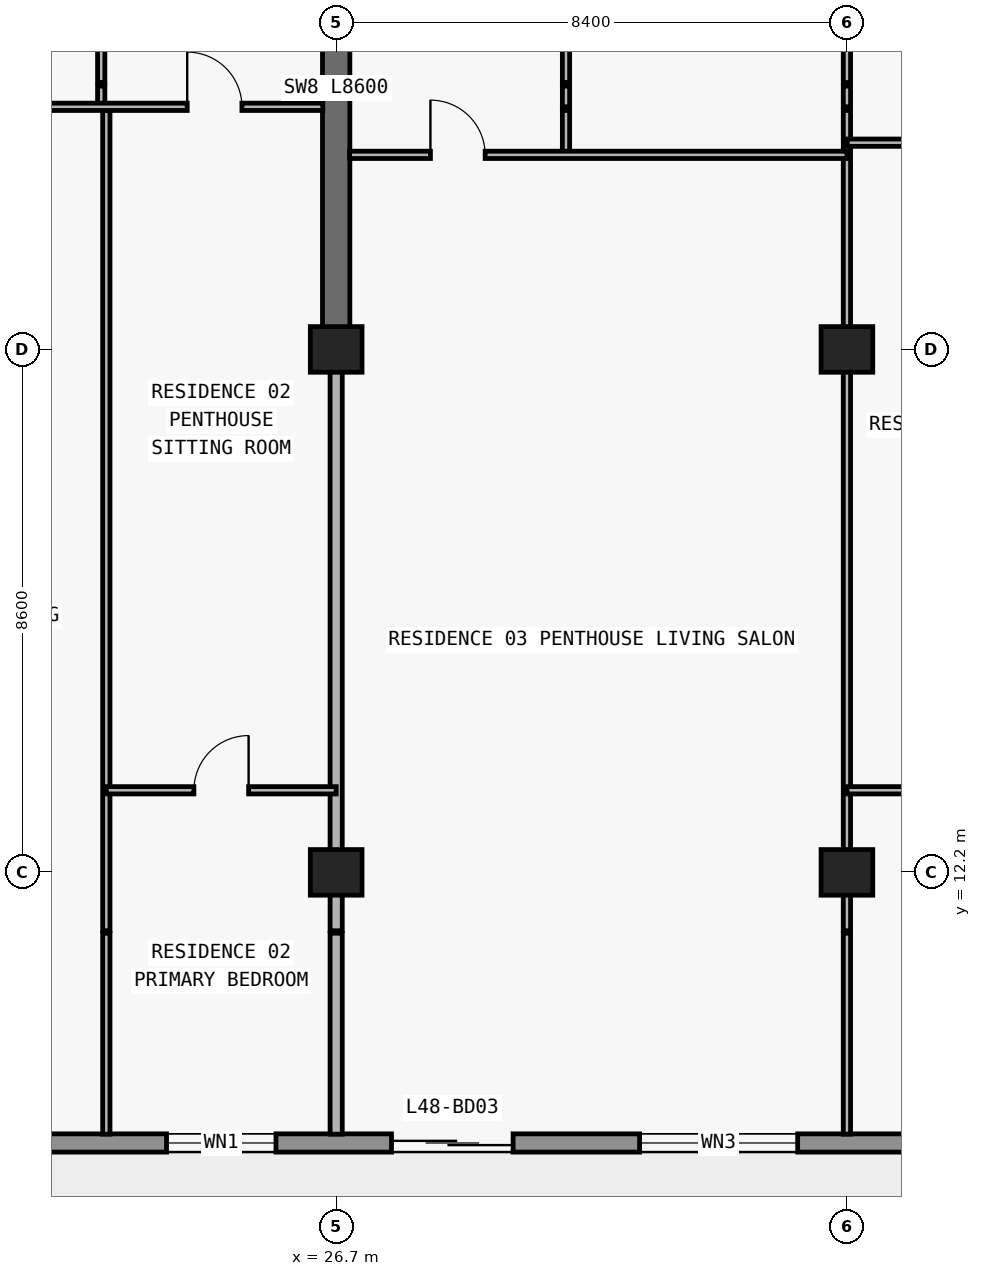
"""IFC4 building model, lengths in metres.
Left out: names, types, materials, properties, quantities, classifications, styles, units other than length and angle.
Written with IfcOpenShell. Run it as: python <this file> out.ifc"""

import sys

from ifc_helpers import new_model, si_unit, direction, frame, frame_2d, origin, origin_2d, place, context, subcontext, project, spatial, rectangle, extrude, element, fill, save


model = new_model("IFC4")
c1 = context("Model", 3, precision=1e-05, world=origin(), true_north=direction((0.0, 1.0)))
c2 = subcontext(c1, "Body", "Model", "MODEL_VIEW")
j1 = project(units=[si_unit("LENGTHUNIT", "METRE"), si_unit("PLANEANGLEUNIT", "RADIAN")], contexts=[c1])
p1 = place(None, origin())
s1 = spatial("IfcSite", under=j1, at=p1, CompositionType="ELEMENT")
p2 = place(p1, origin())
s2 = spatial("IfcBuilding", under=s1, at=p2, CompositionType="ELEMENT")
p3 = place(p2, frame((0.0, 0.0, 173.7)))
s3 = spatial("IfcBuildingStorey", under=s2, at=p3, CompositionType="ELEMENT", Elevation=173.7)
for number, where, z_axis, x_axis in (
    (1, (26.7, 12.2, 0.0), (0.0, 0.0, 1.0), (1.0, 0.0, 0.0)),
    (2, (35.1, 12.2, 0.0), (0.0, 0.0, 1.0), (1.0, 0.0, 0.0)),
    (3, (26.7, 20.8, 0.0), (0.0, 0.0, 1.0), (1.0, 0.0, 0.0)),
    (4, (35.1, 20.8, 0.0), (0.0, 0.0, 1.0), (1.0, 0.0, 0.0)),
):
    element("IfcColumn", number, at=place(p3, frame(where, z_axis=z_axis, x_axis=x_axis)), inside=s3, PredefinedType="COLUMN", context=c2, shape_type="SweptSolid", body=[
        extrude(rectangle(XDim=0.85, YDim=0.75, at=origin_2d()), origin(), (0.0, 0.0, 1.0), 3.05),
    ])
p4 = place(p3, frame((26.7, 20.8, 0.0), z_axis=(0.0, 0.0, 1.0), x_axis=(0.0, 1.0, 0.0)))
e5 = element("IfcWall", 5, at=p4, inside=s3, PredefinedType="SHEAR", context=c2, shape_type="SweptSolid", body=[
    extrude(rectangle(XDim=8.6, YDim=0.45, at=frame_2d((4.3, 0.0))), origin(), (0.0, 0.0, 1.0), 3.05),
])
p5 = place(p3, frame((67.7, 7.75, 0.0), z_axis=(0.0, 0.0, 1.0), x_axis=(-1.0, 0.0, 0.0)))
e6 = element("IfcWall", 6, at=p5, inside=s3, PredefinedType="STANDARD", context=c2, shape_type="SweptSolid", body=[
    extrude(rectangle(XDim=57.6, YDim=0.3, at=frame_2d((28.8, 0.0))), origin(), (0.0, 0.0, 1.0), 3.05),
])
p6 = place(p5, frame((54.673, 0.0, 0.0)))
e7 = element("IfcOpeningElement", 7, at=p6, cuts=e6, PredefinedType="OPENING", context=c2, shape_type="SweptSolid", body=[
    extrude(rectangle(XDim=2.0, YDim=2.3, at=frame_2d((1.0, 1.15))), frame((0.0, 0.16, 0.0), z_axis=(0.0, -1.0, 0.0), x_axis=(1.0, 0.0, 0.0)), (0.0, 0.0, 1.0), 0.32),
])
p7 = place(p5, frame((50.473, 0.0, 0.85)))
e8 = element("IfcOpeningElement", 8, at=p7, cuts=e6, PredefinedType="OPENING", context=c2, shape_type="SweptSolid", body=[
    extrude(rectangle(XDim=2.2, YDim=1.55, at=frame_2d((1.1, 0.775))), frame((0.0, 0.16, 0.0), z_axis=(0.0, -1.0, 0.0), x_axis=(1.0, 0.0, 0.0)), (0.0, 0.0, 1.0), 0.32),
])
p8 = place(p5, frame((46.09, 0.0, 0.0)))
e9 = element("IfcOpeningElement", 9, at=p8, cuts=e6, PredefinedType="OPENING", context=c2, shape_type="SweptSolid", body=[
    extrude(rectangle(XDim=2.0, YDim=2.3, at=frame_2d((1.0, 1.15))), frame((0.0, 0.16, 0.0), z_axis=(0.0, -1.0, 0.0), x_axis=(1.0, 0.0, 0.0)), (0.0, 0.0, 1.0), 0.32),
])
p9 = place(p5, frame((41.99, 0.0, 0.85)))
e10 = element("IfcOpeningElement", 10, at=p9, cuts=e6, PredefinedType="OPENING", context=c2, shape_type="SweptSolid", body=[
    extrude(rectangle(XDim=1.8, YDim=1.55, at=frame_2d((0.9, 0.775))), frame((0.0, 0.16, 0.0), z_axis=(0.0, -1.0, 0.0), x_axis=(1.0, 0.0, 0.0)), (0.0, 0.0, 1.0), 0.32),
])
p10 = place(p5, frame((38.09, 0.0, 0.0)))
e11 = element("IfcOpeningElement", 11, at=p10, cuts=e6, PredefinedType="OPENING", context=c2, shape_type="SweptSolid", body=[
    extrude(rectangle(XDim=2.0, YDim=2.3, at=frame_2d((1.0, 1.15))), frame((0.0, 0.16, 0.0), z_axis=(0.0, -1.0, 0.0), x_axis=(1.0, 0.0, 0.0)), (0.0, 0.0, 1.0), 0.32),
])
p11 = place(p5, frame((33.41, 0.0, 0.65)))
e12 = element("IfcOpeningElement", 12, at=p11, cuts=e6, PredefinedType="OPENING", context=c2, shape_type="SweptSolid", body=[
    extrude(rectangle(XDim=2.6, YDim=1.85, at=frame_2d((1.3, 0.925))), frame((0.0, 0.16, 0.0), z_axis=(0.0, -1.0, 0.0), x_axis=(1.0, 0.0, 0.0)), (0.0, 0.0, 1.0), 0.32),
])
p12 = place(p5, frame((27.7, 0.0, 0.85)))
e13 = element("IfcOpeningElement", 13, at=p12, cuts=e6, PredefinedType="OPENING", context=c2, shape_type="SweptSolid", body=[
    extrude(rectangle(XDim=2.2, YDim=1.55, at=frame_2d((1.1, 0.775))), frame((0.0, 0.16, 0.0), z_axis=(0.0, -1.0, 0.0), x_axis=(1.0, 0.0, 0.0)), (0.0, 0.0, 1.0), 0.32),
])
p13 = place(p5, frame((19.7, 0.0, 0.85)))
e14 = element("IfcOpeningElement", 14, at=p13, cuts=e6, PredefinedType="OPENING", context=c2, shape_type="SweptSolid", body=[
    extrude(rectangle(XDim=2.2, YDim=1.55, at=frame_2d((1.1, 0.775))), frame((0.0, 0.16, 0.0), z_axis=(0.0, -1.0, 0.0), x_axis=(1.0, 0.0, 0.0)), (0.0, 0.0, 1.0), 0.32),
])
p14 = place(p5, frame((13.29, 0.0, 0.0)))
e15 = element("IfcOpeningElement", 15, at=p14, cuts=e6, PredefinedType="OPENING", context=c2, shape_type="SweptSolid", body=[
    extrude(rectangle(XDim=2.0, YDim=2.3, at=frame_2d((1.0, 1.15))), frame((0.0, 0.16, 0.0), z_axis=(0.0, -1.0, 0.0), x_axis=(1.0, 0.0, 0.0)), (0.0, 0.0, 1.0), 0.32),
])
p15 = place(p5, frame((9.19, 0.0, 0.85)))
e16 = element("IfcOpeningElement", 16, at=p15, cuts=e6, PredefinedType="OPENING", context=c2, shape_type="SweptSolid", body=[
    extrude(rectangle(XDim=1.8, YDim=1.55, at=frame_2d((0.9, 0.775))), frame((0.0, 0.16, 0.0), z_axis=(0.0, -1.0, 0.0), x_axis=(1.0, 0.0, 0.0)), (0.0, 0.0, 1.0), 0.32),
])
p16 = place(p5, frame((5.273, 0.0, 0.0)))
e17 = element("IfcOpeningElement", 17, at=p16, cuts=e6, PredefinedType="OPENING", context=c2, shape_type="SweptSolid", body=[
    extrude(rectangle(XDim=2.0, YDim=2.3, at=frame_2d((1.0, 1.15))), frame((0.0, 0.16, 0.0), z_axis=(0.0, -1.0, 0.0), x_axis=(1.0, 0.0, 0.0)), (0.0, 0.0, 1.0), 0.32),
])
p17 = place(p5, frame((1.073, 0.0, 0.85)))
e18 = element("IfcOpeningElement", 18, at=p17, cuts=e6, PredefinedType="OPENING", context=c2, shape_type="SweptSolid", body=[
    extrude(rectangle(XDim=2.2, YDim=1.55, at=frame_2d((1.1, 0.775))), frame((0.0, 0.16, 0.0), z_axis=(0.0, -1.0, 0.0), x_axis=(1.0, 0.0, 0.0)), (0.0, 0.0, 1.0), 0.32),
])
p18 = place(p3, frame((22.836, 24.79, 0.0), z_axis=(0.0, 0.0, 1.0), x_axis=(0.0, 1.0, 0.0)))
e19 = element("IfcWall", 19, at=p18, inside=s3, PredefinedType="PARTITIONING", context=c2, shape_type="SweptSolid", body=[
    extrude(rectangle(XDim=0.34, YDim=0.12, at=frame_2d((0.17, 0.0))), origin(), (0.0, 0.0, 1.0), 3.05),
])
p19 = place(p3, frame((22.836, 25.19, 0.0), z_axis=(0.0, 0.0, 1.0), x_axis=(0.0, 1.0, 0.0)))
e20 = element("IfcWall", 20, at=p19, inside=s3, PredefinedType="PARTITIONING", context=c2, shape_type="SweptSolid", body=[
    extrude(rectangle(XDim=4.69, YDim=0.12, at=frame_2d((2.345, 0.0))), origin(), (0.0, 0.0, 1.0), 3.05),
])
p20 = place(p19, frame((1.895, 0.0, 0.0)))
e21 = element("IfcOpeningElement", 21, at=p20, cuts=e20, PredefinedType="OPENING", context=c2, shape_type="SweptSolid", body=[
    extrude(rectangle(XDim=0.9, YDim=2.15, at=frame_2d((0.45, 1.075))), frame((0.0, 0.07, 0.0), z_axis=(0.0, -1.0, 0.0), x_axis=(1.0, 0.0, 0.0)), (0.0, 0.0, 1.0), 0.14),
])
p21 = place(p3, frame((22.92, 7.895, 0.0), z_axis=(0.0, 0.0, 1.0), x_axis=(0.0, 1.0, 0.0)))
e22 = element("IfcWall", 22, at=p21, inside=s3, PredefinedType="PARTITIONING", context=c2, shape_type="SweptSolid", body=[
    extrude(rectangle(XDim=3.305, YDim=0.12, at=frame_2d((1.652, 0.0))), origin(), (0.0, 0.0, 1.0), 3.05),
])
p22 = place(p3, frame((22.92, 11.24, 0.0), z_axis=(0.0, 0.0, 1.0), x_axis=(0.0, 1.0, 0.0)))
e23 = element("IfcWall", 23, at=p22, inside=s3, PredefinedType="PARTITIONING", context=c2, shape_type="SweptSolid", body=[
    extrude(rectangle(XDim=13.49, YDim=0.12, at=frame_2d((6.745, 0.0))), origin(), (0.0, 0.0, 1.0), 3.05),
])
p23 = place(p3, frame((26.7, 7.895, 0.0), z_axis=(0.0, 0.0, 1.0), x_axis=(0.0, 1.0, 0.0)))
e24 = element("IfcWall", 24, at=p23, inside=s3, PredefinedType="PARTITIONING", context=c2, shape_type="SweptSolid", body=[
    extrude(rectangle(XDim=3.305, YDim=0.2, at=frame_2d((1.652, 0.0))), origin(), (0.0, 0.0, 1.0), 3.05),
])
p24 = place(p3, frame((26.7, 11.24, 0.0), z_axis=(0.0, 0.0, 1.0), x_axis=(0.0, 1.0, 0.0)))
e25 = element("IfcWall", 25, at=p24, inside=s3, PredefinedType="PARTITIONING", context=c2, shape_type="SweptSolid", body=[
    extrude(rectangle(XDim=9.555, YDim=0.2, at=frame_2d((4.777, 0.0))), origin(), (0.0, 0.0, 1.0), 2.263),
])
p25 = place(p3, frame((30.48, 24.0, 0.0), z_axis=(0.0, 0.0, 1.0), x_axis=(0.0, 1.0, 0.0)))
e26 = element("IfcWall", 26, at=p25, inside=s3, PredefinedType="PARTITIONING", context=c2, shape_type="SweptSolid", body=[
    extrude(rectangle(XDim=0.73, YDim=0.12, at=frame_2d((0.365, 0.0))), origin(), (0.0, 0.0, 1.0), 3.05),
])
p26 = place(p3, frame((30.48, 24.79, 0.0), z_axis=(0.0, 0.0, 1.0), x_axis=(0.0, 1.0, 0.0)))
e27 = element("IfcWall", 27, at=p26, inside=s3, PredefinedType="PARTITIONING", context=c2, shape_type="SweptSolid", body=[
    extrude(rectangle(XDim=0.34, YDim=0.12, at=frame_2d((0.17, 0.0))), origin(), (0.0, 0.0, 1.0), 3.05),
])
p27 = place(p3, frame((30.48, 25.19, 0.0), z_axis=(0.0, 0.0, 1.0), x_axis=(0.0, 1.0, 0.0)))
e28 = element("IfcWall", 28, at=p27, inside=s3, PredefinedType="PARTITIONING", context=c2, shape_type="SweptSolid", body=[
    extrude(rectangle(XDim=3.61, YDim=0.12, at=frame_2d((1.805, 0.0))), origin(), (0.0, 0.0, 1.0), 3.05),
])
p28 = place(p27, frame((1.355, 0.0, 0.0)))
e29 = element("IfcOpeningElement", 29, at=p28, cuts=e28, PredefinedType="OPENING", context=c2, shape_type="SweptSolid", body=[
    extrude(rectangle(XDim=0.9, YDim=2.15, at=frame_2d((0.45, 1.075))), frame((0.0, 0.07, 0.0), z_axis=(0.0, -1.0, 0.0), x_axis=(1.0, 0.0, 0.0)), (0.0, 0.0, 1.0), 0.14),
])
p29 = place(p3, frame((35.1, 7.895, 0.0), z_axis=(0.0, 0.0, 1.0), x_axis=(0.0, 1.0, 0.0)))
e30 = element("IfcWall", 30, at=p29, inside=s3, PredefinedType="PARTITIONING", context=c2, shape_type="SweptSolid", body=[
    extrude(rectangle(XDim=3.305, YDim=0.12, at=frame_2d((1.652, 0.0))), origin(), (0.0, 0.0, 1.0), 3.05),
])
p30 = place(p3, frame((35.1, 11.24, 0.0), z_axis=(0.0, 0.0, 1.0), x_axis=(0.0, 1.0, 0.0)))
e31 = element("IfcWall", 31, at=p30, inside=s3, PredefinedType="PARTITIONING", context=c2, shape_type="SweptSolid", body=[
    extrude(rectangle(XDim=13.49, YDim=0.12, at=frame_2d((6.745, 0.0))), origin(), (0.0, 0.0, 1.0), 2.263),
])
p31 = place(p3, frame((35.1, 24.79, 0.0), z_axis=(0.0, 0.0, 1.0), x_axis=(0.0, 1.0, 0.0)))
e32 = element("IfcWall", 32, at=p31, inside=s3, PredefinedType="PARTITIONING", context=c2, shape_type="SweptSolid", body=[
    extrude(rectangle(XDim=0.34, YDim=0.12, at=frame_2d((0.17, 0.0))), origin(), (0.0, 0.0, 1.0), 2.263),
])
p32 = place(p3, frame((35.1, 25.19, 0.0), z_axis=(0.0, 0.0, 1.0), x_axis=(0.0, 1.0, 0.0)))
e33 = element("IfcWall", 33, at=p32, inside=s3, PredefinedType="PARTITIONING", context=c2, shape_type="SweptSolid", body=[
    extrude(rectangle(XDim=4.69, YDim=0.12, at=frame_2d((2.345, 0.0))), origin(), (0.0, 0.0, 1.0), 2.263),
])
p33 = place(p32, frame((1.255, 0.0, 0.0)))
e34 = element("IfcOpeningElement", 34, at=p33, cuts=e33, PredefinedType="OPENING", context=c2, shape_type="SweptSolid", body=[
    extrude(rectangle(XDim=0.9, YDim=2.15, at=frame_2d((0.45, 1.075))), frame((0.0, 0.07, 0.0), z_axis=(0.0, -1.0, 0.0), x_axis=(1.0, 0.0, 0.0)), (0.0, 0.0, 1.0), 0.14),
])
p34 = place(p3, frame((22.92, 13.55, 0.0), z_axis=(0.0, 0.0, 1.0), x_axis=(1.0, 0.0, 0.0)))
e35 = element("IfcWall", 35, at=p34, inside=s3, PredefinedType="PARTITIONING", context=c2, shape_type="SweptSolid", body=[
    extrude(rectangle(XDim=3.78, YDim=0.12, at=frame_2d((1.89, 0.0))), origin(), (0.0, 0.0, 1.0), 3.05),
])
p35 = place(p34, frame((1.44, 0.0, 0.0)))
e36 = element("IfcOpeningElement", 36, at=p35, cuts=e35, PredefinedType="OPENING", context=c2, shape_type="SweptSolid", body=[
    extrude(rectangle(XDim=0.9, YDim=2.15, at=frame_2d((0.45, 1.075))), frame((0.0, 0.07, 0.0), z_axis=(0.0, -1.0, 0.0), x_axis=(1.0, 0.0, 0.0)), (0.0, 0.0, 1.0), 0.14),
])
p36 = place(p3, frame((35.1, 13.55, 0.0), z_axis=(0.0, 0.0, 1.0), x_axis=(1.0, 0.0, 0.0)))
e37 = element("IfcWall", 37, at=p36, inside=s3, PredefinedType="PARTITIONING", context=c2, shape_type="SweptSolid", body=[
    extrude(rectangle(XDim=16.0, YDim=0.12, at=frame_2d((8.0, 0.0))), origin(), (0.0, 0.0, 1.0), 3.05),
])
p37 = place(p36, frame((3.35, 0.0, 0.0)))
e38 = element("IfcOpeningElement", 38, at=p37, cuts=e37, PredefinedType="OPENING", context=c2, shape_type="SweptSolid", body=[
    extrude(rectangle(XDim=0.9, YDim=2.15, at=frame_2d((0.45, 1.075))), frame((0.0, 0.07, 0.0), z_axis=(0.0, -1.0, 0.0), x_axis=(1.0, 0.0, 0.0)), (0.0, 0.0, 1.0), 0.14),
])
p38 = place(p36, frame((11.35, 0.0, 0.0)))
e39 = element("IfcOpeningElement", 39, at=p38, cuts=e37, PredefinedType="OPENING", context=c2, shape_type="SweptSolid", body=[
    extrude(rectangle(XDim=0.9, YDim=2.15, at=frame_2d((0.45, 1.075))), frame((0.0, 0.07, 0.0), z_axis=(0.0, -1.0, 0.0), x_axis=(1.0, 0.0, 0.0)), (0.0, 0.0, 1.0), 0.14),
])
p39 = place(p3, frame((26.92, 24.0, 0.0), z_axis=(0.0, 0.0, 1.0), x_axis=(1.0, 0.0, 0.0)))
e40 = element("IfcWall", 40, at=p39, inside=s3, PredefinedType="PARTITIONING", context=c2, shape_type="SweptSolid", body=[
    extrude(rectangle(XDim=8.18, YDim=0.12, at=frame_2d((4.09, 0.0))), origin(), (0.0, 0.0, 1.0), 3.05),
])
p40 = place(p39, frame((1.33, 0.0, 0.0)))
e41 = element("IfcOpeningElement", 41, at=p40, cuts=e40, PredefinedType="OPENING", context=c2, shape_type="SweptSolid", body=[
    extrude(rectangle(XDim=0.9, YDim=2.15, at=frame_2d((0.45, 1.075))), frame((0.0, 0.07, 0.0), z_axis=(0.0, -1.0, 0.0), x_axis=(1.0, 0.0, 0.0)), (0.0, 0.0, 1.0), 0.14),
])
p41 = place(p3, frame((35.105, 24.2, 0.0), z_axis=(0.0, 0.0, 1.0), x_axis=(1.0, 0.0, 0.0)))
e42 = element("IfcWall", 42, at=p41, inside=s3, PredefinedType="PARTITIONING", context=c2, shape_type="SweptSolid", body=[
    extrude(rectangle(XDim=7.59, YDim=0.12, at=frame_2d((3.795, 0.0))), origin(), (0.0, 0.0, 1.0), 3.05),
])
p42 = place(p41, frame((3.345, 0.0, 0.0)))
e43 = element("IfcOpeningElement", 43, at=p42, cuts=e42, PredefinedType="OPENING", context=c2, shape_type="SweptSolid", body=[
    extrude(rectangle(XDim=0.9, YDim=2.15, at=frame_2d((0.45, 1.075))), frame((0.0, 0.07, 0.0), z_axis=(0.0, -1.0, 0.0), x_axis=(1.0, 0.0, 0.0)), (0.0, 0.0, 1.0), 0.14),
])
p43 = place(p3, frame((18.3, 24.79, 0.0), z_axis=(0.0, 0.0, 1.0), x_axis=(1.0, 0.0, 0.0)))
e44 = element("IfcWall", 44, at=p43, inside=s3, PredefinedType="PARTITIONING", context=c2, shape_type="SweptSolid", body=[
    extrude(rectangle(XDim=8.18, YDim=0.12, at=frame_2d((4.09, 0.0))), origin(), (0.0, 0.0, 1.0), 3.05),
])
p44 = place(p43, frame((1.818, 0.0, 0.0)))
e45 = element("IfcOpeningElement", 45, at=p44, cuts=e44, PredefinedType="OPENING", context=c2, shape_type="SweptSolid", body=[
    extrude(rectangle(XDim=0.9, YDim=2.15, at=frame_2d((0.45, 1.075))), frame((0.0, 0.07, 0.0), z_axis=(0.0, -1.0, 0.0), x_axis=(1.0, 0.0, 0.0)), (0.0, 0.0, 1.0), 0.14),
])
p45 = place(p43, frame((5.95, 0.0, 0.0)))
e46 = element("IfcOpeningElement", 46, at=p45, cuts=e44, PredefinedType="OPENING", context=c2, shape_type="SweptSolid", body=[
    extrude(rectangle(XDim=0.9, YDim=2.15, at=frame_2d((0.45, 1.075))), frame((0.0, 0.07, 0.0), z_axis=(0.0, -1.0, 0.0), x_axis=(1.0, 0.0, 0.0)), (0.0, 0.0, 1.0), 0.14),
])
p46 = place(p9, origin())
e47 = element("IfcWindow", 47, at=p46, inside=s3, PartitioningType="SINGLE_PANEL", PredefinedType="WINDOW", context=c2, shape_type="SweptSolid", body=[
    extrude(rectangle(XDim=1.8, YDim=1.55, at=frame_2d((0.9, 0.775))), frame((0.0, 0.03, 0.0), z_axis=(0.0, -1.0, 0.0), x_axis=(1.0, 0.0, 0.0)), (0.0, 0.0, 1.0), 0.06),
])
fill(e10, e47)
p47 = place(p10, origin())
e48 = element("IfcDoor", 48, at=p47, inside=s3, OperationType="DOUBLE_DOOR_SLIDING", PredefinedType="DOOR", context=c2, shape_type="SweptSolid", body=[
    extrude(rectangle(XDim=2.0, YDim=2.3, at=frame_2d((1.0, 1.15))), frame((0.0, 0.025, 0.0), z_axis=(0.0, -1.0, 0.0), x_axis=(1.0, 0.0, 0.0)), (0.0, 0.0, 1.0), 0.05),
])
fill(e11, e48)
p48 = place(p11, origin())
e49 = element("IfcWindow", 49, at=p48, inside=s3, PartitioningType="SINGLE_PANEL", PredefinedType="WINDOW", context=c2, shape_type="SweptSolid", body=[
    extrude(rectangle(XDim=2.6, YDim=1.85, at=frame_2d((1.3, 0.925))), frame((0.0, 0.03, 0.0), z_axis=(0.0, -1.0, 0.0), x_axis=(1.0, 0.0, 0.0)), (0.0, 0.0, 1.0), 0.06),
])
fill(e12, e49)
p49 = place(p45, origin())
e50 = element("IfcDoor", 50, at=p49, inside=s3, OperationType="SINGLE_SWING_LEFT", PredefinedType="DOOR", context=c2, shape_type="SweptSolid", body=[
    extrude(rectangle(XDim=0.9, YDim=2.15, at=frame_2d((0.45, 1.075))), frame((0.0, 0.025, 0.0), z_axis=(0.0, -1.0, 0.0), x_axis=(1.0, 0.0, 0.0)), (0.0, 0.0, 1.0), 0.05),
])
fill(e46, e50)
p50 = place(p35, origin())
e51 = element("IfcDoor", 51, at=p50, inside=s3, OperationType="SINGLE_SWING_RIGHT", PredefinedType="DOOR", context=c2, shape_type="SweptSolid", body=[
    extrude(rectangle(XDim=0.9, YDim=2.15, at=frame_2d((0.45, 1.075))), frame((0.0, 0.025, 0.0), z_axis=(0.0, -1.0, 0.0), x_axis=(1.0, 0.0, 0.0)), (0.0, 0.0, 1.0), 0.05),
])
fill(e36, e51)
p51 = place(p40, origin())
e52 = element("IfcDoor", 52, at=p51, inside=s3, OperationType="SINGLE_SWING_LEFT", PredefinedType="DOOR", context=c2, shape_type="SweptSolid", body=[
    extrude(rectangle(XDim=0.9, YDim=2.15, at=frame_2d((0.45, 1.075))), frame((0.0, 0.025, 0.0), z_axis=(0.0, -1.0, 0.0), x_axis=(1.0, 0.0, 0.0)), (0.0, 0.0, 1.0), 0.05),
])
fill(e41, e52)
save(model, sys.argv[1])
